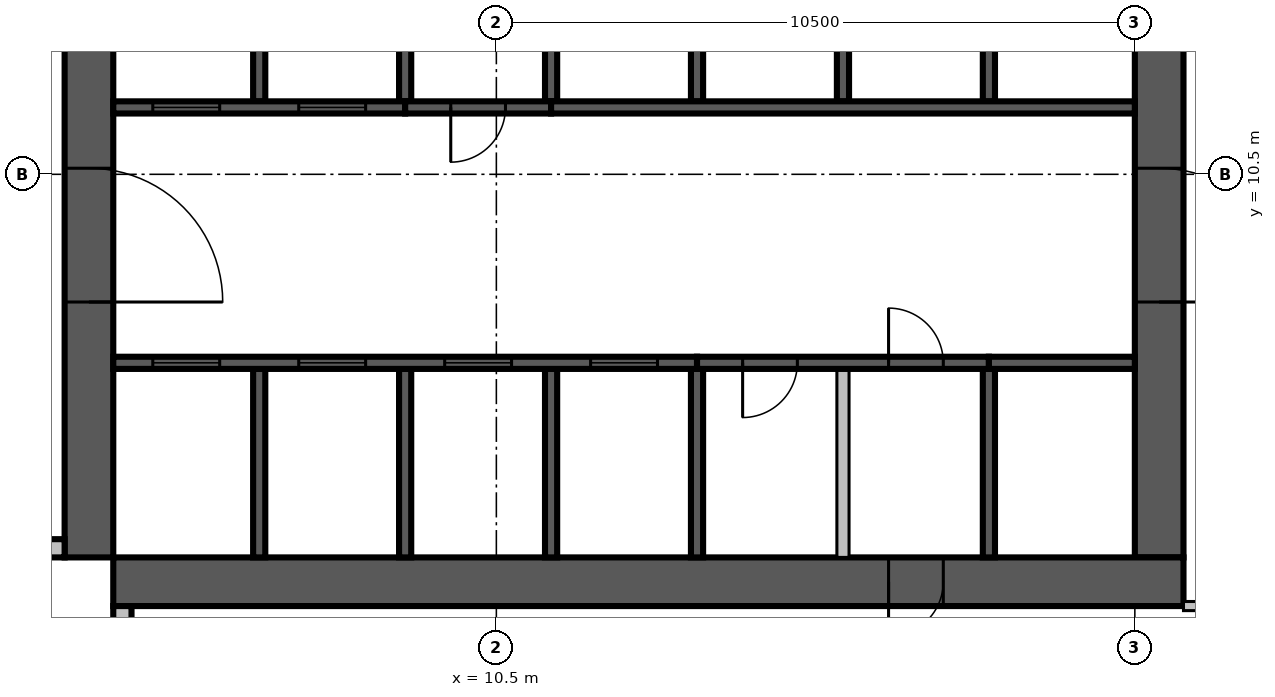
"""IFC4 building model, lengths in metres.
Left out: names, types, materials, properties, quantities, classifications, styles, units other than length and angle.
Written with IfcOpenShell. Run it as: python <this file> out.ifc"""

import sys

from ifc_helpers import new_model, si_unit, direction, frame, frame_2d, origin, place, context, subcontext, project, spatial, rectangle, extrude, source, transform, mapped, element, fill, save


model = new_model("IFC4")
c1 = context("Model", 3, precision=1e-05, world=origin(), true_north=direction((0.0, 1.0)))
c2 = subcontext(c1, "Body", "Model", "MODEL_VIEW")
j1 = project(units=[si_unit("LENGTHUNIT", "METRE"), si_unit("PLANEANGLEUNIT", "RADIAN")], contexts=[c1])
p1 = place(None, origin())
s1 = spatial("IfcSite", under=j1, at=p1, CompositionType="ELEMENT")
p2 = place(p1, origin())
s2 = spatial("IfcBuilding", under=s1, at=p2, CompositionType="ELEMENT")
p3 = place(p2, frame((0.0, 0.0, 223.4)))
s3 = spatial("IfcBuildingStorey", under=s2, at=p3, CompositionType="ELEMENT", Elevation=223.4)
m1 = source(origin(), c2, "Body", "SweptSolid", [
    extrude(rectangle(XDim=17.6, YDim=0.8, at=frame_2d((8.8, 0.0))), origin(), (0.0, 0.0, 1.0), 3.8),
])
p4 = place(p3, frame((3.8, 4.2, 0.0), z_axis=(0.0, 0.0, 1.0), x_axis=(0.0, 1.0, 0.0)))
e1 = element("IfcWall", 1, at=p4, inside=s3, PredefinedType="SHEAR", context=c2, shape_type="MappedRepresentation", body=[
    mapped(m1, transform((0.0, 0.0, 0.0), scale=1.0)),
])
m2 = source(origin(), c2, "Body", "SweptSolid", [
    extrude(rectangle(XDim=2.2, YDim=2.1, at=frame_2d((1.1, 1.05))), frame((0.0, 0.41, 0.0), z_axis=(0.0, -1.0, 0.0), x_axis=(1.0, 0.0, 0.0)), (0.0, 0.0, 1.0), 0.82),
])
p5 = place(p4, frame((4.2, 0.0, 0.0)))
e2 = element("IfcOpeningElement", 2, at=p5, cuts=e1, PredefinedType="OPENING", context=c2, shape_type="MappedRepresentation", body=[
    mapped(m2, transform((0.0, 0.0, 0.0), scale=1.0)),
])
m3 = source(origin(), c2, "Body", "SweptSolid", [
    extrude(rectangle(XDim=0.9, YDim=2.1, at=frame_2d((0.45, 1.05))), frame((0.0, 0.41, 0.0), z_axis=(0.0, -1.0, 0.0), x_axis=(1.0, 0.0, 0.0)), (0.0, 0.0, 1.0), 0.82),
])
p6 = place(p4, frame((10.95, 0.0, 0.0)))
e3 = element("IfcOpeningElement", 3, at=p6, cuts=e1, PredefinedType="OPENING", context=c2, shape_type="MappedRepresentation", body=[
    mapped(m3, transform((0.0, 0.0, 0.0), scale=1.0)),
])
m4 = source(origin(), c2, "Body", "SweptSolid", [
    extrude(rectangle(XDim=16.8, YDim=0.8, at=frame_2d((8.4, 0.0))), origin(), (0.0, 0.0, 1.0), 3.8),
])
p7 = place(p3, frame((21.4, 4.2, 0.0), z_axis=(0.0, 0.0, 1.0), x_axis=(0.0, 1.0, 0.0)))
e4 = element("IfcWall", 4, at=p7, inside=s3, PredefinedType="SHEAR", context=c2, shape_type="MappedRepresentation", body=[
    mapped(m4, transform((0.0, 0.0, 0.0), scale=1.0)),
])
p8 = place(p7, frame((4.2, 0.0, 0.0)))
e5 = element("IfcOpeningElement", 5, at=p8, cuts=e4, PredefinedType="OPENING", context=c2, shape_type="MappedRepresentation", body=[
    mapped(m2, transform((0.0, 0.0, 0.0), scale=1.0)),
])
m5 = source(origin(), c2, "Body", "SweptSolid", [
    extrude(rectangle(XDim=1.2, YDim=2.1, at=frame_2d((0.6, 1.05))), frame((0.0, 0.41, 0.0), z_axis=(0.0, -1.0, 0.0), x_axis=(1.0, 0.0, 0.0)), (0.0, 0.0, 1.0), 0.82),
])
p9 = place(p7, frame((14.7, 0.0, 0.0)))
e6 = element("IfcOpeningElement", 6, at=p9, cuts=e4, PredefinedType="OPENING", context=c2, shape_type="MappedRepresentation", body=[
    mapped(m5, transform((0.0, 0.0, 0.0), scale=1.0)),
])
p10 = place(p3, frame((4.2, 3.8, 0.0), z_axis=(0.0, 0.0, 1.0), x_axis=(1.0, 0.0, 0.0)))
e7 = element("IfcWall", 7, at=p10, inside=s3, PredefinedType="SHEAR", context=c2, shape_type="MappedRepresentation", body=[
    mapped(m1, transform((0.0, 0.0, 0.0), scale=1.0)),
])
p11 = place(p10, frame((12.75, 0.0, 0.0)))
e8 = element("IfcOpeningElement", 8, at=p11, cuts=e7, PredefinedType="OPENING", context=c2, shape_type="MappedRepresentation", body=[
    mapped(m3, transform((0.0, 0.0, 0.0), scale=1.0)),
])
m6 = source(origin(), c2, "Body", "SweptSolid", [
    extrude(rectangle(XDim=3.4, YDim=0.3, at=frame_2d((1.7, 0.0))), origin(), (0.0, 0.0, 1.0), 3.4),
])
p12 = place(p3, frame((0.0, 4.35, 0.0), z_axis=(0.0, 0.0, 1.0), x_axis=(1.0, 0.0, 0.0)))
e9 = element("IfcWall", 9, at=p12, inside=s3, PredefinedType="STANDARD", context=c2, shape_type="MappedRepresentation", body=[
    mapped(m6, transform((0.0, 0.0, 0.0), scale=1.0)),
])
m7 = source(origin(), c2, "Body", "SweptSolid", [
    extrude(rectangle(XDim=1.8, YDim=2.3, at=frame_2d((0.9, 1.15))), frame((0.0, 0.16, 0.0), z_axis=(0.0, -1.0, 0.0), x_axis=(1.0, 0.0, 0.0)), (0.0, 0.0, 1.0), 0.32),
])
p13 = place(p12, frame((1.2, 0.0, 0.6)))
e10 = element("IfcOpeningElement", 10, at=p13, cuts=e9, PredefinedType="OPENING", context=c2, shape_type="MappedRepresentation", body=[
    mapped(m7, transform((0.0, 0.0, 0.0), scale=1.0)),
])
p14 = place(p3, frame((4.35, 3.4, 0.0), z_axis=(0.0, 0.0, 1.0), x_axis=(0.0, -1.0, 0.0)))
e11 = element("IfcWall", 11, at=p14, inside=s3, PredefinedType="STANDARD", context=c2, shape_type="MappedRepresentation", body=[
    mapped(m6, transform((0.0, 0.0, 0.0), scale=1.0)),
])
p15 = place(p14, frame((0.4, 0.0, 0.6)))
e12 = element("IfcOpeningElement", 12, at=p15, cuts=e11, PredefinedType="OPENING", context=c2, shape_type="MappedRepresentation", body=[
    mapped(m7, transform((0.0, 0.0, 0.0), scale=1.0)),
])
m8 = source(origin(), c2, "Body", "SweptSolid", [
    extrude(rectangle(XDim=3.1, YDim=0.2, at=frame_2d((1.55, 0.0))), origin(), (0.0, 0.0, 1.0), 3.8),
])
for number, where, z_axis, x_axis in (
    (13, (6.6, 4.2, 0.0), (0.0, 0.0, 1.0), (0.0, 1.0, 0.0)),
    (14, (9.0, 4.2, 0.0), (0.0, 0.0, 1.0), (0.0, 1.0, 0.0)),
    (15, (11.4, 4.2, 0.0), (0.0, 0.0, 1.0), (0.0, 1.0, 0.0)),
):
    element("IfcWall", number, at=place(p3, frame(where, z_axis=z_axis, x_axis=x_axis)), inside=s3, PredefinedType="SOLIDWALL", context=c2, shape_type="MappedRepresentation", body=[
        mapped(m8, transform((0.0, 0.0, 0.0), scale=1.0)),
    ])
m9 = source(origin(), c2, "Body", "SweptSolid", [
    extrude(rectangle(XDim=3.1, YDim=0.2, at=frame_2d((1.55, 0.0))), origin(), (0.0, 0.0, 1.0), 3.4),
])
for number, where, z_axis, x_axis in (
    (16, (13.8, 4.2, 0.0), (0.0, 0.0, 1.0), (0.0, 1.0, 0.0)),
    (17, (18.6, 4.2, 0.0), (0.0, 0.0, 1.0), (0.0, 1.0, 0.0)),
):
    element("IfcWall", number, at=place(p3, frame(where, z_axis=z_axis, x_axis=x_axis)), inside=s3, PredefinedType="SOLIDWALL", context=c2, shape_type="MappedRepresentation", body=[
        mapped(m9, transform((0.0, 0.0, 0.0), scale=1.0)),
    ])
m10 = source(origin(), c2, "Body", "SweptSolid", [
    extrude(rectangle(XDim=3.1, YDim=0.2, at=frame_2d((1.55, 0.0))), origin(), (0.0, 0.0, 1.0), 3.4),
])
p16 = place(p3, frame((16.2, 4.2, 0.0), z_axis=(0.0, 0.0, 1.0), x_axis=(0.0, 1.0, 0.0)))
e18 = element("IfcWall", 18, at=p16, inside=s3, PredefinedType="PARTITIONING", context=c2, shape_type="MappedRepresentation", body=[
    mapped(m10, transform((0.0, 0.0, 0.0), scale=1.0)),
])
m11 = source(origin(), c2, "Body", "SweptSolid", [
    extrude(rectangle(XDim=3.0, YDim=0.2, at=frame_2d((1.5, 0.0))), origin(), (0.0, 0.0, 1.0), 3.8),
])
p17 = place(p3, frame((6.6, 11.7, 0.0), z_axis=(0.0, 0.0, 1.0), x_axis=(0.0, 1.0, 0.0)))
e19 = element("IfcWall", 19, at=p17, inside=s3, PredefinedType="SOLIDWALL", context=c2, shape_type="MappedRepresentation", body=[
    mapped(m11, transform((0.0, 0.0, 0.0), scale=1.0)),
])
m12 = source(origin(), c2, "Body", "SweptSolid", [
    extrude(rectangle(XDim=3.0, YDim=0.2, at=frame_2d((1.5, 0.0))), origin(), (0.0, 0.0, 1.0), 3.4),
])
for number, where, z_axis, x_axis in (
    (20, (9.0, 11.7, 0.0), (0.0, 0.0, 1.0), (0.0, 1.0, 0.0)),
    (21, (11.4, 11.7, 0.0), (0.0, 0.0, 1.0), (0.0, 1.0, 0.0)),
):
    element("IfcWall", number, at=place(p3, frame(where, z_axis=z_axis, x_axis=x_axis)), inside=s3, PredefinedType="SOLIDWALL", context=c2, shape_type="MappedRepresentation", body=[
        mapped(m12, transform((0.0, 0.0, 0.0), scale=1.0)),
    ])
for number, where, z_axis, x_axis in (
    (22, (13.8, 11.7, 0.0), (0.0, 0.0, 1.0), (0.0, 1.0, 0.0)),
    (23, (16.2, 11.7, 0.0), (0.0, 0.0, 1.0), (0.0, 1.0, 0.0)),
    (24, (18.6, 11.7, 0.0), (0.0, 0.0, 1.0), (0.0, 1.0, 0.0)),
):
    element("IfcWall", number, at=place(p3, frame(where, z_axis=z_axis, x_axis=x_axis)), inside=s3, PredefinedType="SOLIDWALL", context=c2, shape_type="MappedRepresentation", body=[
        mapped(m11, transform((0.0, 0.0, 0.0), scale=1.0)),
    ])
m13 = source(origin(), c2, "Body", "SweptSolid", [
    extrude(rectangle(XDim=9.6, YDim=0.2, at=frame_2d((4.8, 0.0))), origin(), (0.0, 0.0, 1.0), 3.8),
])
p18 = place(p3, frame((4.2, 7.4, 0.0), z_axis=(0.0, 0.0, 1.0), x_axis=(1.0, 0.0, 0.0)))
e25 = element("IfcWall", 25, at=p18, inside=s3, PredefinedType="SOLIDWALL", context=c2, shape_type="MappedRepresentation", body=[
    mapped(m13, transform((0.0, 0.0, 0.0), scale=1.0)),
])
m14 = source(origin(), c2, "Body", "SweptSolid", [
    extrude(rectangle(XDim=1.1, YDim=2.1, at=frame_2d((0.55, 1.05))), frame((0.0, 0.11, 0.0), z_axis=(0.0, -1.0, 0.0), x_axis=(1.0, 0.0, 0.0)), (0.0, 0.0, 1.0), 0.22),
])
p19 = place(p18, frame((0.65, 0.0, 0.0)))
e26 = element("IfcOpeningElement", 26, at=p19, cuts=e25, PredefinedType="OPENING", context=c2, shape_type="MappedRepresentation", body=[
    mapped(m14, transform((0.0, 0.0, 0.0), scale=1.0)),
])
p20 = place(p18, frame((3.05, 0.0, 0.0)))
e27 = element("IfcOpeningElement", 27, at=p20, cuts=e25, PredefinedType="OPENING", context=c2, shape_type="MappedRepresentation", body=[
    mapped(m14, transform((0.0, 0.0, 0.0), scale=1.0)),
])
p21 = place(p18, frame((5.45, 0.0, 0.0)))
e28 = element("IfcOpeningElement", 28, at=p21, cuts=e25, PredefinedType="OPENING", context=c2, shape_type="MappedRepresentation", body=[
    mapped(m14, transform((0.0, 0.0, 0.0), scale=1.0)),
])
p22 = place(p18, frame((7.85, 0.0, 0.0)))
e29 = element("IfcOpeningElement", 29, at=p22, cuts=e25, PredefinedType="OPENING", context=c2, shape_type="MappedRepresentation", body=[
    mapped(m14, transform((0.0, 0.0, 0.0), scale=1.0)),
])
m15 = source(origin(), c2, "Body", "SweptSolid", [
    extrude(rectangle(XDim=4.8, YDim=0.2, at=frame_2d((2.4, 0.0))), origin(), (0.0, 0.0, 1.0), 3.4),
])
p23 = place(p3, frame((13.8, 7.4, 0.0), z_axis=(0.0, 0.0, 1.0), x_axis=(1.0, 0.0, 0.0)))
e30 = element("IfcWall", 30, at=p23, inside=s3, PredefinedType="SOLIDWALL", context=c2, shape_type="MappedRepresentation", body=[
    mapped(m15, transform((0.0, 0.0, 0.0), scale=1.0)),
])
m16 = source(origin(), c2, "Body", "SweptSolid", [
    extrude(rectangle(XDim=0.9, YDim=2.1, at=frame_2d((0.45, 1.05))), frame((0.0, 0.11, 0.0), z_axis=(0.0, -1.0, 0.0), x_axis=(1.0, 0.0, 0.0)), (0.0, 0.0, 1.0), 0.22),
])
p24 = place(p23, frame((0.75, 0.0, 0.0)))
e31 = element("IfcOpeningElement", 31, at=p24, cuts=e30, PredefinedType="OPENING", context=c2, shape_type="MappedRepresentation", body=[
    mapped(m16, transform((0.0, 0.0, 0.0), scale=1.0)),
])
p25 = place(p23, frame((3.15, 0.0, 0.0)))
e32 = element("IfcOpeningElement", 32, at=p25, cuts=e30, PredefinedType="OPENING", context=c2, shape_type="MappedRepresentation", body=[
    mapped(m16, transform((0.0, 0.0, 0.0), scale=1.0)),
])
m17 = source(origin(), c2, "Body", "SweptSolid", [
    extrude(rectangle(XDim=2.4, YDim=0.2, at=frame_2d((1.2, 0.0))), origin(), (0.0, 0.0, 1.0), 3.8),
])
p26 = place(p3, frame((18.6, 7.4, 0.0), z_axis=(0.0, 0.0, 1.0), x_axis=(1.0, 0.0, 0.0)))
e33 = element("IfcWall", 33, at=p26, inside=s3, PredefinedType="SOLIDWALL", context=c2, shape_type="MappedRepresentation", body=[
    mapped(m17, transform((0.0, 0.0, 0.0), scale=1.0)),
])
m18 = source(origin(), c2, "Body", "SweptSolid", [
    extrude(rectangle(XDim=4.8, YDim=0.2, at=frame_2d((2.4, 0.0))), origin(), (0.0, 0.0, 1.0), 3.8),
])
p27 = place(p3, frame((4.2, 11.6, 0.0), z_axis=(0.0, 0.0, 1.0), x_axis=(1.0, 0.0, 0.0)))
e34 = element("IfcWall", 34, at=p27, inside=s3, PredefinedType="SOLIDWALL", context=c2, shape_type="MappedRepresentation", body=[
    mapped(m18, transform((0.0, 0.0, 0.0), scale=1.0)),
])
p28 = place(p27, frame((0.65, 0.0, 0.0)))
e35 = element("IfcOpeningElement", 35, at=p28, cuts=e34, PredefinedType="OPENING", context=c2, shape_type="MappedRepresentation", body=[
    mapped(m14, transform((0.0, 0.0, 0.0), scale=1.0)),
])
p29 = place(p27, frame((3.05, 0.0, 0.0)))
e36 = element("IfcOpeningElement", 36, at=p29, cuts=e34, PredefinedType="OPENING", context=c2, shape_type="MappedRepresentation", body=[
    mapped(m14, transform((0.0, 0.0, 0.0), scale=1.0)),
])
m19 = source(origin(), c2, "Body", "SweptSolid", [
    extrude(rectangle(XDim=2.4, YDim=0.2, at=frame_2d((1.2, 0.0))), origin(), (0.0, 0.0, 1.0), 3.4),
])
p30 = place(p3, frame((9.0, 11.6, 0.0), z_axis=(0.0, 0.0, 1.0), x_axis=(1.0, 0.0, 0.0)))
e37 = element("IfcWall", 37, at=p30, inside=s3, PredefinedType="SOLIDWALL", context=c2, shape_type="MappedRepresentation", body=[
    mapped(m19, transform((0.0, 0.0, 0.0), scale=1.0)),
])
p31 = place(p30, frame((0.75, 0.0, 0.0)))
e38 = element("IfcOpeningElement", 38, at=p31, cuts=e37, PredefinedType="OPENING", context=c2, shape_type="MappedRepresentation", body=[
    mapped(m16, transform((0.0, 0.0, 0.0), scale=1.0)),
])
p32 = place(p3, frame((11.4, 11.6, 0.0), z_axis=(0.0, 0.0, 1.0), x_axis=(1.0, 0.0, 0.0)))
e39 = element("IfcWall", 39, at=p32, inside=s3, PredefinedType="SOLIDWALL", context=c2, shape_type="MappedRepresentation", body=[
    mapped(m13, transform((0.0, 0.0, 0.0), scale=1.0)),
])
m20 = source(origin(), c2, "Body", "SweptSolid", [
    extrude(rectangle(XDim=7.525, YDim=0.15, at=frame_2d((3.763, 0.0))), origin(), (0.0, 0.0, 1.0), 3.4),
])
p33 = place(p3, frame((21.8, 3.4, 0.0), z_axis=(0.0, 0.0, 1.0), x_axis=(1.0, 0.0, 0.0)))
e40 = element("IfcWall", 40, at=p33, inside=s3, PredefinedType="PARTITIONING", context=c2, shape_type="MappedRepresentation", body=[
    mapped(m20, transform((0.0, 0.0, 0.0), scale=1.0)),
])
m21 = source(origin(), c2, "Body", "SweptSolid", [
    extrude(rectangle(XDim=1.0, YDim=2.1, at=frame_2d((0.5, 1.05))), frame((0.0, 0.085, 0.0), z_axis=(0.0, -1.0, 0.0), x_axis=(1.0, 0.0, 0.0)), (0.0, 0.0, 1.0), 0.17),
])
p34 = place(p33, frame((3.6, 0.0, 0.0)))
e41 = element("IfcOpeningElement", 41, at=p34, cuts=e40, PredefinedType="OPENING", context=c2, shape_type="MappedRepresentation", body=[
    mapped(m21, transform((0.0, 0.0, 0.0), scale=1.0)),
])
m22 = source(origin(), c2, "Body", "SweptSolid", [
    extrude(rectangle(XDim=0.9, YDim=2.1, at=frame_2d((0.45, 1.05))), frame((0.0, 0.085, 0.0), z_axis=(0.0, -1.0, 0.0), x_axis=(1.0, 0.0, 0.0)), (0.0, 0.0, 1.0), 0.17),
])
p35 = place(p33, frame((2.312, 0.0, 0.0)))
e42 = element("IfcOpeningElement", 42, at=p35, cuts=e40, PredefinedType="OPENING", context=c2, shape_type="MappedRepresentation", body=[
    mapped(m22, transform((0.0, 0.0, 0.0), scale=1.0)),
])
m23 = source(origin(), c2, "Body", "SweptSolid", [
    extrude(rectangle(XDim=1.1, YDim=2.1, at=frame_2d((0.55, 1.05))), frame((0.0, 0.025, 0.0), z_axis=(0.0, -1.0, 0.0), x_axis=(1.0, 0.0, 0.0)), (0.0, 0.0, 1.0), 0.05),
])
p36 = place(p19, origin())
e43 = element("IfcDoor", 43, at=p36, inside=s3, OperationType="SLIDING_TO_LEFT", PredefinedType="DOOR", context=c2, shape_type="MappedRepresentation", body=[
    mapped(m23, transform((0.0, 0.0, 0.0), scale=1.0)),
])
fill(e26, e43)
p37 = place(p20, origin())
e44 = element("IfcDoor", 44, at=p37, inside=s3, OperationType="SLIDING_TO_LEFT", PredefinedType="DOOR", context=c2, shape_type="MappedRepresentation", body=[
    mapped(m23, transform((0.0, 0.0, 0.0), scale=1.0)),
])
fill(e27, e44)
p38 = place(p21, origin())
e45 = element("IfcDoor", 45, at=p38, inside=s3, OperationType="SLIDING_TO_LEFT", PredefinedType="DOOR", context=c2, shape_type="MappedRepresentation", body=[
    mapped(m23, transform((0.0, 0.0, 0.0), scale=1.0)),
])
fill(e28, e45)
p39 = place(p22, origin())
e46 = element("IfcDoor", 46, at=p39, inside=s3, OperationType="SLIDING_TO_LEFT", PredefinedType="DOOR", context=c2, shape_type="MappedRepresentation", body=[
    mapped(m23, transform((0.0, 0.0, 0.0), scale=1.0)),
])
fill(e29, e46)
m24 = source(origin(), c2, "Body", "SweptSolid", [
    extrude(rectangle(XDim=0.9, YDim=2.1, at=frame_2d((0.45, 1.05))), frame((0.0, 0.025, 0.0), z_axis=(0.0, -1.0, 0.0), x_axis=(1.0, 0.0, 0.0)), (0.0, 0.0, 1.0), 0.05),
])
p40 = place(p24, origin())
e47 = element("IfcDoor", 47, at=p40, inside=s3, OperationType="SINGLE_SWING_RIGHT", PredefinedType="DOOR", context=c2, shape_type="MappedRepresentation", body=[
    mapped(m24, transform((0.0, 0.0, 0.0), scale=1.0)),
])
fill(e31, e47)
p41 = place(p25, origin())
e48 = element("IfcDoor", 48, at=p41, inside=s3, OperationType="SINGLE_SWING_LEFT", PredefinedType="DOOR", context=c2, shape_type="MappedRepresentation", body=[
    mapped(m24, transform((0.0, 0.0, 0.0), scale=1.0)),
])
fill(e32, e48)
p42 = place(p28, origin())
e49 = element("IfcDoor", 49, at=p42, inside=s3, OperationType="SLIDING_TO_LEFT", PredefinedType="DOOR", context=c2, shape_type="MappedRepresentation", body=[
    mapped(m23, transform((0.0, 0.0, 0.0), scale=1.0)),
])
fill(e35, e49)
p43 = place(p29, origin())
e50 = element("IfcDoor", 50, at=p43, inside=s3, OperationType="SLIDING_TO_LEFT", PredefinedType="DOOR", context=c2, shape_type="MappedRepresentation", body=[
    mapped(m23, transform((0.0, 0.0, 0.0), scale=1.0)),
])
fill(e36, e50)
p44 = place(p31, origin())
e51 = element("IfcDoor", 51, at=p44, inside=s3, OperationType="SINGLE_SWING_RIGHT", PredefinedType="DOOR", context=c2, shape_type="MappedRepresentation", body=[
    mapped(m24, transform((0.0, 0.0, 0.0), scale=1.0)),
])
fill(e38, e51)
m25 = source(origin(), c2, "Body", "SweptSolid", [
    extrude(rectangle(XDim=2.2, YDim=2.1, at=frame_2d((1.1, 1.05))), frame((0.0, 0.025, 0.0), z_axis=(0.0, -1.0, 0.0), x_axis=(1.0, 0.0, 0.0)), (0.0, 0.0, 1.0), 0.05),
])
p45 = place(p8, origin())
e52 = element("IfcDoor", 52, at=p45, inside=s3, OperationType="DOUBLE_DOOR_SINGLE_SWING", PredefinedType="DOOR", context=c2, shape_type="MappedRepresentation", body=[
    mapped(m25, transform((0.0, 0.0, 0.0), scale=1.0)),
])
fill(e5, e52)
p46 = place(p5, origin())
e53 = element("IfcDoor", 53, at=p46, inside=s3, OperationType="DOUBLE_DOOR_SINGLE_SWING", PredefinedType="DOOR", context=c2, shape_type="MappedRepresentation", body=[
    mapped(m25, transform((0.0, 0.0, 0.0), scale=1.0)),
])
fill(e2, e53)
p47 = place(p11, origin())
e54 = element("IfcDoor", 54, at=p47, inside=s3, OperationType="SINGLE_SWING_RIGHT", PredefinedType="DOOR", context=c2, shape_type="MappedRepresentation", body=[
    mapped(m24, transform((0.0, 0.0, 0.0), scale=1.0)),
])
fill(e8, e54)
save(model, sys.argv[1])
